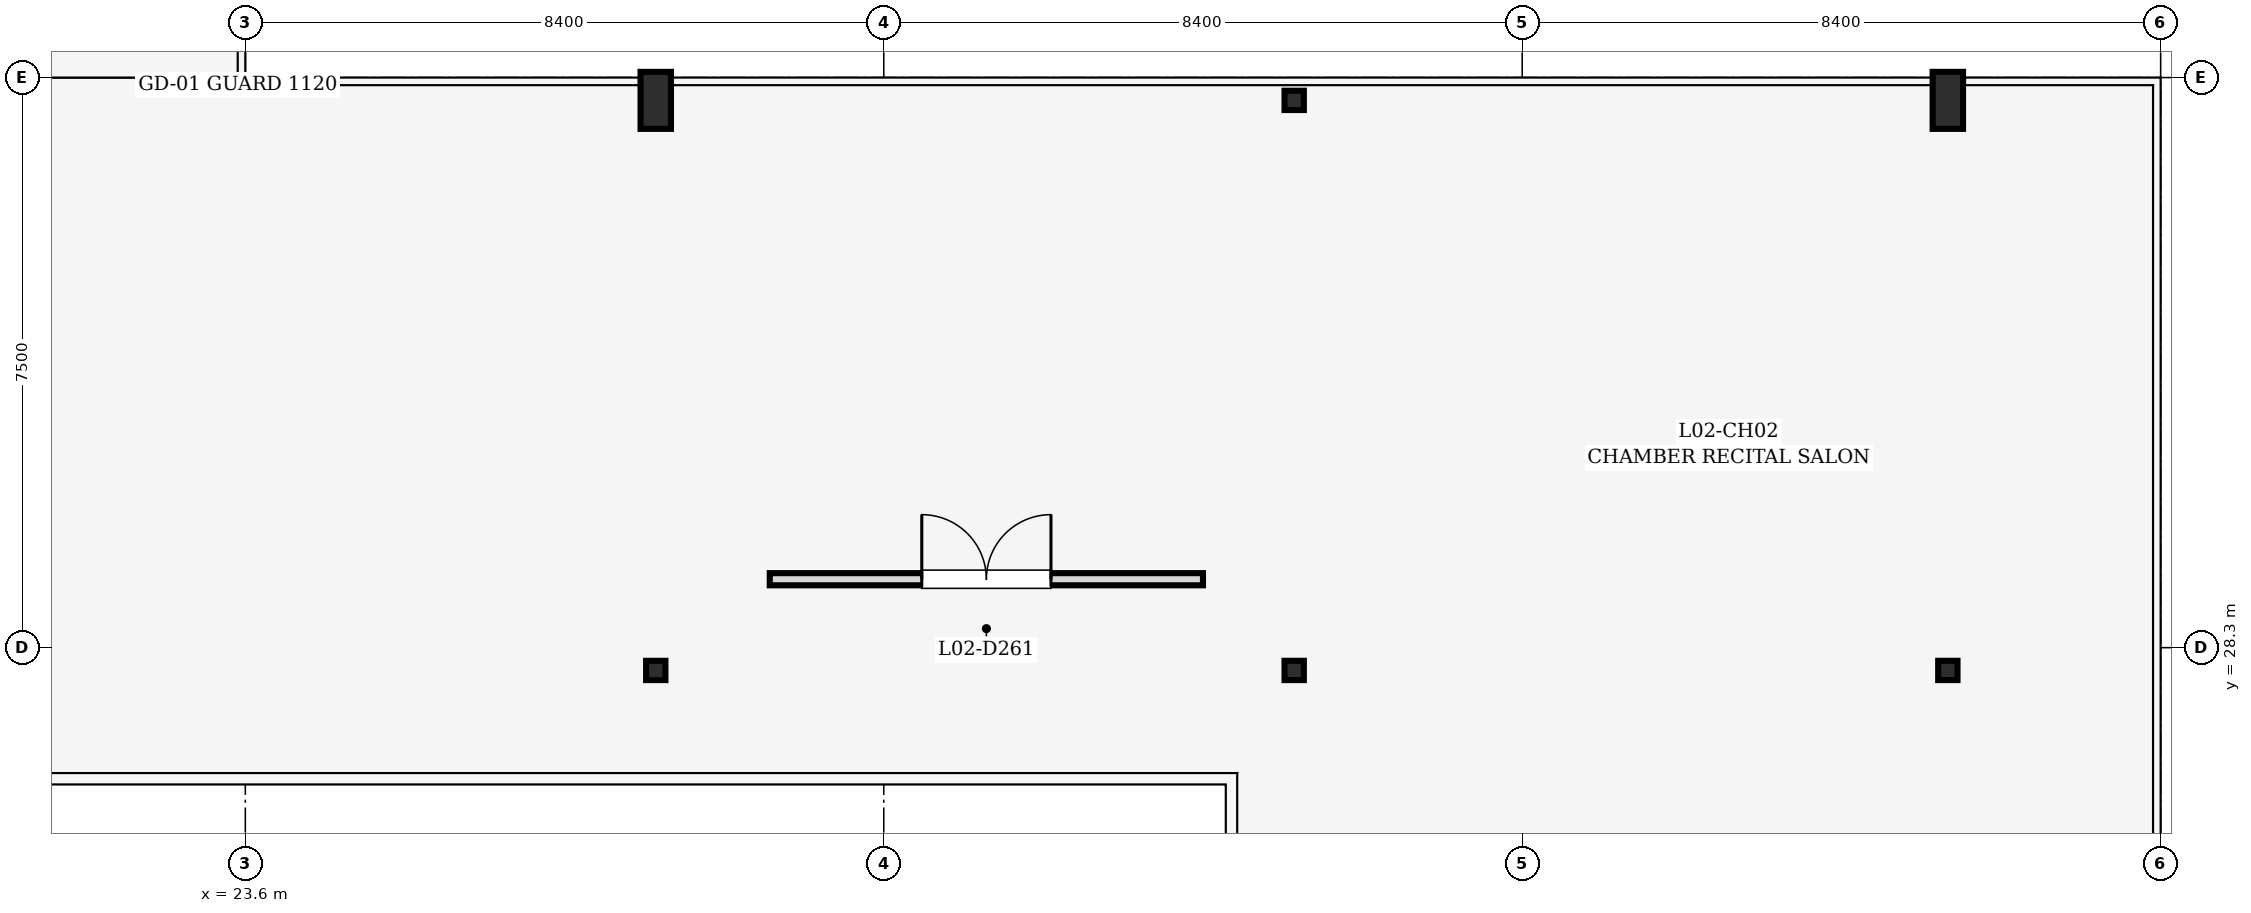
"""IFC4 building model, lengths in metres.
Left out: names, types, materials, properties, quantities, classifications, styles, units other than length and angle.
Written with IfcOpenShell. Run it as: python <this file> out.ifc"""

import sys

from ifc_helpers import new_model, si_unit, direction, frame, frame_2d, origin, origin_2d, place, context, subcontext, project, spatial, rectangle, i_section, extrude, element, fill, save


model = new_model("IFC4")
c1 = context("Model", 3, precision=1e-05, world=origin(), true_north=direction((0.0, 1.0)))
c2 = subcontext(c1, "Body", "Model", "MODEL_VIEW")
j1 = project(units=[si_unit("LENGTHUNIT", "METRE"), si_unit("PLANEANGLEUNIT", "RADIAN")], contexts=[c1])
p1 = place(None, origin())
s1 = spatial("IfcSite", under=j1, at=p1, CompositionType="ELEMENT")
p2 = place(p1, origin())
s2 = spatial("IfcBuilding", under=s1, at=p2, CompositionType="ELEMENT")
p3 = place(p2, frame((0.0, 0.0, 5.4)))
s3 = spatial("IfcBuildingStorey", under=s2, at=p3, CompositionType="ELEMENT", Elevation=5.4)
p4 = place(p3, frame((29.0, 28.0, 0.0), z_axis=(0.0, 0.0, 1.0), x_axis=(1.0, 0.0, 0.0)))
e1 = element("IfcColumn", 1, at=p4, inside=s3, PredefinedType="COLUMN", context=c2, shape_type="SweptSolid", body=[
    extrude(i_section(OverallWidth=0.254, OverallDepth=0.254, WebThickness=0.009, FlangeThickness=0.014, at=origin_2d()), origin(), (0.0, 0.0, 1.0), 4.8),
])
p5 = place(p3, frame((29.0, 35.5, 0.0), z_axis=(0.0, 0.0, 1.0), x_axis=(1.0, 0.0, 0.0)))
e2 = element("IfcColumn", 2, at=p5, inside=s3, PredefinedType="PILASTER", context=c2, shape_type="SweptSolid", body=[
    extrude(rectangle(XDim=0.4, YDim=0.75, at=origin_2d()), origin(), (0.0, 0.0, 1.0), 4.8),
])
for number, where, z_axis, x_axis in (
    (3, (37.4, 28.0, 0.0), (0.0, 0.0, 1.0), (1.0, 0.0, 0.0)),
    (4, (37.4, 35.5, 0.0), (0.0, 0.0, 1.0), (1.0, 0.0, 0.0)),
    (5, (46.0, 28.0, 0.0), (0.0, 0.0, 1.0), (1.0, 0.0, 0.0)),
):
    element("IfcColumn", number, at=place(p3, frame(where, z_axis=z_axis, x_axis=x_axis)), inside=s3, PredefinedType="COLUMN", context=c2, shape_type="SweptSolid", body=[
        extrude(i_section(OverallWidth=0.254, OverallDepth=0.254, WebThickness=0.009, FlangeThickness=0.014, at=origin_2d()), origin(), (0.0, 0.0, 1.0), 4.8),
    ])
p6 = place(p3, frame((46.0, 35.5, 0.0), z_axis=(0.0, 0.0, 1.0), x_axis=(1.0, 0.0, 0.0)))
e6 = element("IfcColumn", 6, at=p6, inside=s3, PredefinedType="PILASTER", context=c2, shape_type="SweptSolid", body=[
    extrude(rectangle(XDim=0.4, YDim=0.75, at=origin_2d()), origin(), (0.0, 0.0, 1.0), 4.8),
])
p7 = place(p3, frame((30.5, 29.2, 0.0), z_axis=(0.0, 0.0, 1.0), x_axis=(1.0, 0.0, 0.0)))
e7 = element("IfcWall", 7, at=p7, inside=s3, PredefinedType="PARTITIONING", context=c2, shape_type="SweptSolid", body=[
    extrude(rectangle(XDim=5.7, YDim=0.16, at=frame_2d((2.85, 0.0))), origin(), (0.0, 0.0, 1.0), 4.525),
])
p8 = place(p7, frame((2.0, 0.0, 0.0)))
e8 = element("IfcOpeningElement", 8, at=p8, cuts=e7, PredefinedType="OPENING", context=c2, shape_type="SweptSolid", body=[
    extrude(rectangle(XDim=1.7, YDim=2.2, at=frame_2d((0.85, 1.1))), frame((0.0, 0.092, 0.0), z_axis=(0.0, -1.0, 0.0), x_axis=(1.0, 0.0, 0.0)), (0.0, 0.0, 1.0), 0.184),
])
p9 = place(p8, origin())
e9 = element("IfcDoor", 9, at=p9, inside=s3, OperationType="DOUBLE_DOOR_SINGLE_SWING", PredefinedType="DOOR", context=c2, shape_type="SweptSolid", body=[
    extrude(rectangle(XDim=1.7, YDim=2.2, at=frame_2d((0.85, 1.1))), frame((0.0, 0.025, 0.0), z_axis=(0.0, -1.0, 0.0), x_axis=(1.0, 0.0, 0.0)), (0.0, 0.0, 1.0), 0.05),
])
fill(e8, e9)
save(model, sys.argv[1])
